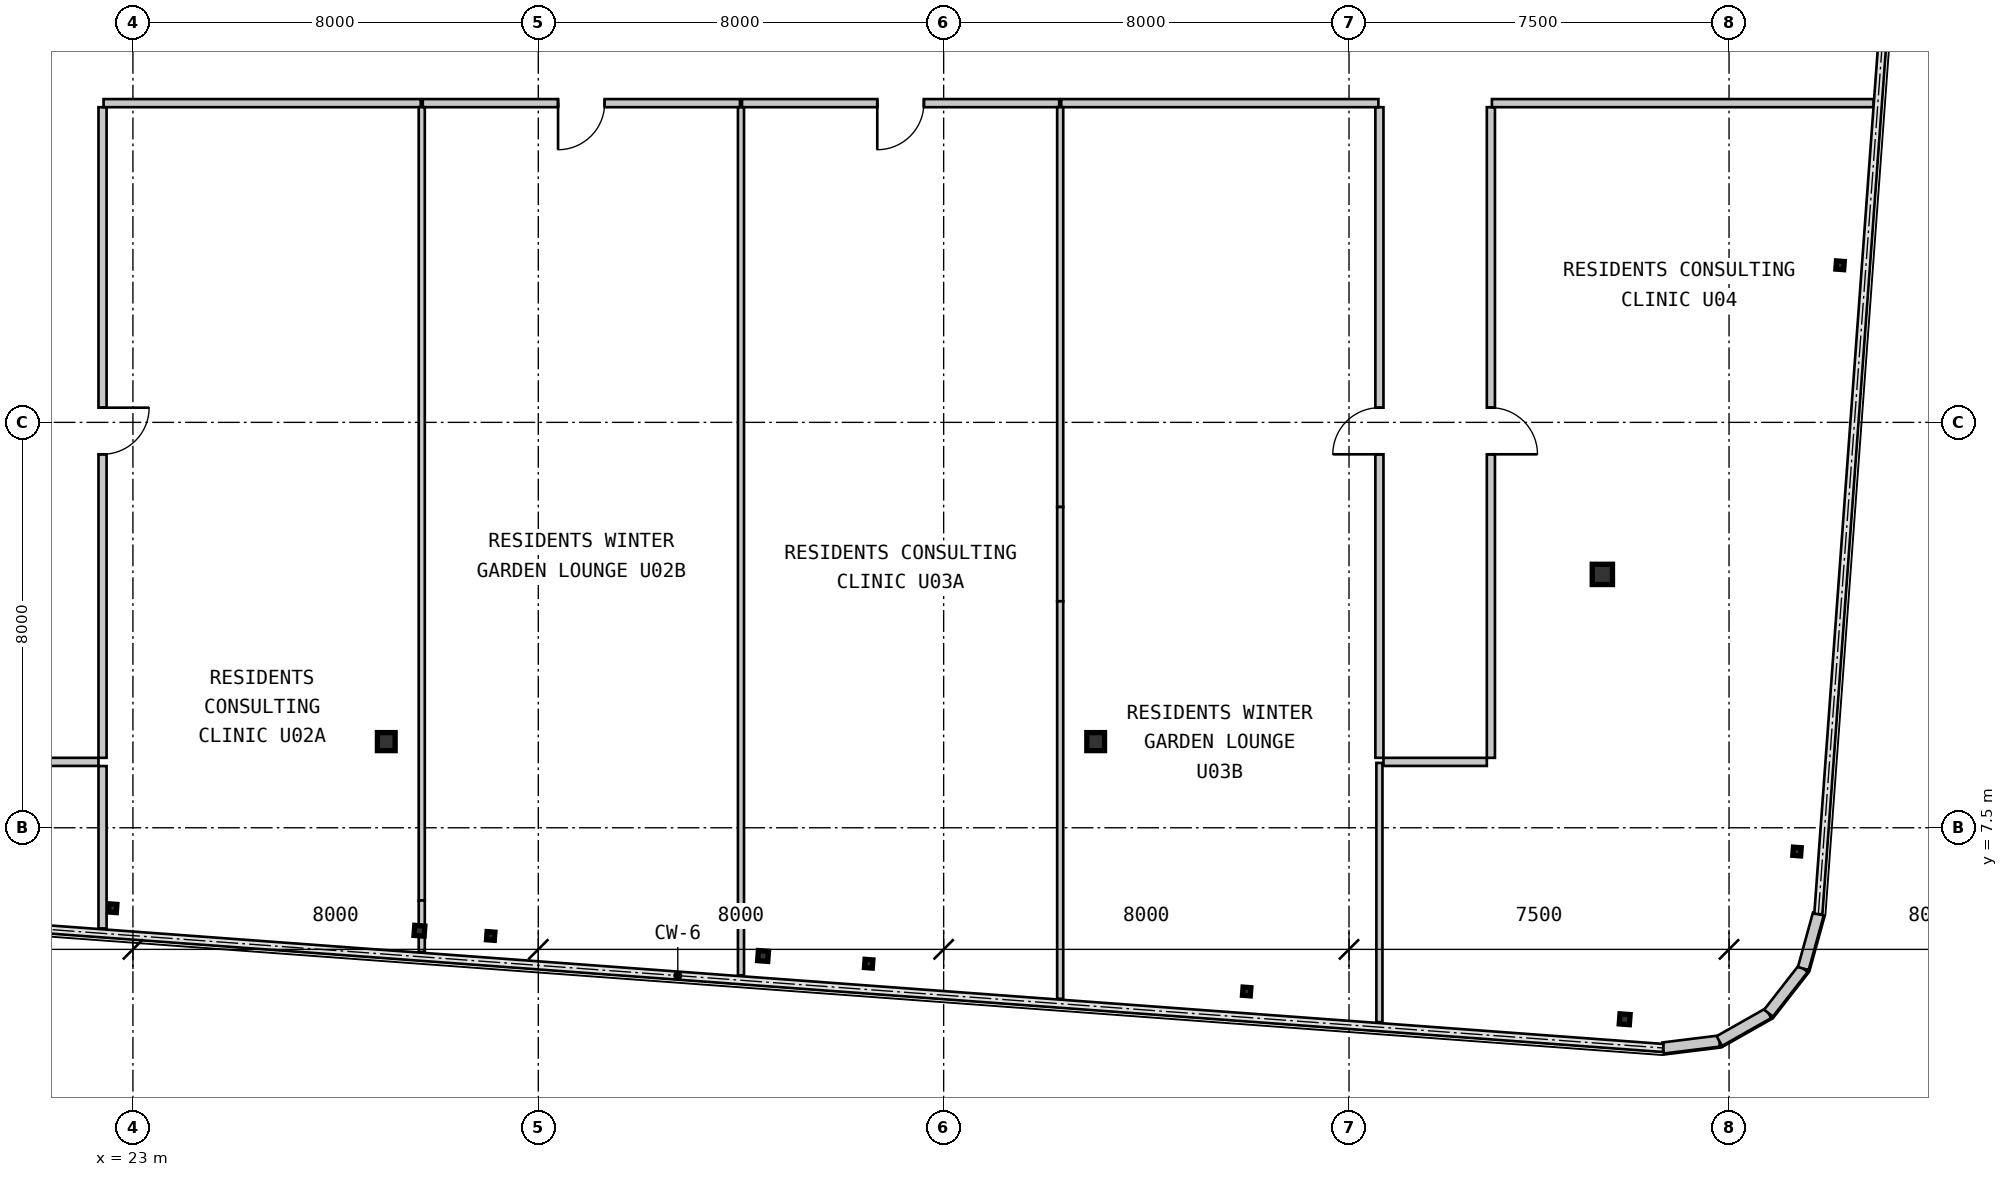
"""IFC4 building model, lengths in metres.
Left out: names, types, materials, properties, quantities, classifications, styles, units other than length and angle.
Written with IfcOpenShell. Run it as: python <this file> out.ifc"""

import sys

from ifc_helpers import new_model, si_unit, direction, frame, frame_2d, origin, origin_2d, place, context, subcontext, project, spatial, rectangle, hollow_rectangle, i_section, extrude, source, transform, mapped, element, fill, save


model = new_model("IFC4")
c1 = context("Model", 3, precision=1e-05, world=origin(), true_north=direction((0.0, 1.0)))
c2 = subcontext(c1, "Body", "Model", "MODEL_VIEW")
j1 = project(units=[si_unit("LENGTHUNIT", "METRE"), si_unit("PLANEANGLEUNIT", "RADIAN")], contexts=[c1])
p1 = place(None, origin())
s1 = spatial("IfcSite", under=j1, at=p1, CompositionType="ELEMENT")
p2 = place(p1, origin())
s2 = spatial("IfcBuilding", under=s1, at=p2, CompositionType="ELEMENT")
p3 = place(p2, frame((0.0, 0.0, 220.85)))
s3 = spatial("IfcBuildingStorey", under=s2, at=p3, CompositionType="ELEMENT", Elevation=220.85)
m1 = source(origin(), c2, "Body", "SweptSolid", [
    extrude(i_section(OverallWidth=0.35, OverallDepth=0.356, WebThickness=0.018, FlangeThickness=0.028, at=origin_2d()), origin(), (0.0, 0.0, 1.0), 3.15),
])
for number, where, z_axis, x_axis in (
    (1, (28.0, 9.2, 0.0), (0.0, 0.0, 1.0), (1.0, 0.0, 0.0)),
    (2, (42.0, 9.2, 0.0), (0.0, 0.0, 1.0), (1.0, 0.0, 0.0)),
):
    element("IfcColumn", number, at=place(p3, frame(where, z_axis=z_axis, x_axis=x_axis)), inside=s3, PredefinedType="COLUMN", context=c2, shape_type="MappedRepresentation", body=[
        mapped(m1, transform((0.0, 0.0, 0.0), scale=1.0)),
    ])
m2 = source(origin(), c2, "Body", "SweptSolid", [
    extrude(hollow_rectangle(XDim=0.4, YDim=0.4, WallThickness=0.016, at=origin_2d()), origin(), (0.0, 0.0, 1.0), 3.15),
])
p4 = place(p3, frame((52.0, 12.5, 0.0), z_axis=(0.0, 0.0, 1.0), x_axis=(1.0, 0.0, 0.0)))
e3 = element("IfcColumn", 3, at=p4, inside=s3, PredefinedType="COLUMN", context=c2, shape_type="MappedRepresentation", body=[
    mapped(m2, transform((0.0, 0.0, 0.0), scale=1.0)),
])
m3 = source(origin(), c2, "Body", "SweptSolid", [
    extrude(i_section(OverallWidth=0.154, OverallDepth=0.162, WebThickness=0.008, FlangeThickness=0.011, at=origin_2d()), origin(), (0.0, 0.0, 1.0), 3.15),
])
for number, where, z_axis, x_axis in (
    (4, (22.601, 5.912, 0.0), (0.0, 0.0, 1.0), (0.997, -0.073, 0.0)),
    (5, (30.061, 5.365, 0.0), (0.0, 0.0, 1.0), (0.997, -0.073, 0.0)),
    (6, (37.521, 4.817, 0.0), (0.0, 0.0, 1.0), (0.997, -0.073, 0.0)),
    (7, (44.98, 4.269, 0.0), (0.0, 0.0, 1.0), (0.997, -0.073, 0.0)),
):
    element("IfcColumn", number, at=place(p3, frame(where, z_axis=z_axis, x_axis=x_axis)), inside=s3, PredefinedType="COLUMN", context=c2, shape_type="MappedRepresentation", body=[
        mapped(m3, transform((0.0, 0.0, 0.0), scale=1.0)),
    ])
m4 = source(origin(), c2, "Body", "SweptSolid", [
    extrude(hollow_rectangle(XDim=0.2, YDim=0.2, WallThickness=0.009, at=origin_2d()), origin(), (0.0, 0.0, 1.0), 3.15),
])
p5 = place(p3, frame((52.44, 3.721, 0.0), z_axis=(0.0, 0.0, 1.0), x_axis=(0.997314477224, -0.073238197128, 0.0)))
e8 = element("IfcColumn", 8, at=p5, inside=s3, PredefinedType="COLUMN", context=c2, shape_type="MappedRepresentation", body=[
    mapped(m4, transform((0.0, 0.0, 0.0), scale=1.0)),
])
for number, where, z_axis, x_axis in (
    (9, (55.842, 7.031, 0.0), (0.0, 0.0, 1.0), (0.997, -0.073, 0.0)),
    (10, (56.691, 18.6, 0.0), (0.0, 0.0, 1.0), (0.997, -0.073, 0.0)),
):
    element("IfcColumn", number, at=place(p3, frame(where, z_axis=z_axis, x_axis=x_axis)), inside=s3, PredefinedType="COLUMN", context=c2, shape_type="MappedRepresentation", body=[
        mapped(m3, transform((0.0, 0.0, 0.0), scale=1.0)),
    ])
for number, where, z_axis, x_axis in (
    (11, (28.654, 5.468, 0.0), (0.0, 0.0, 1.0), (0.997, -0.073, 0.0)),
    (12, (35.436, 4.97, 0.0), (0.0, 0.0, 1.0), (0.997, -0.073, 0.0)),
):
    element("IfcColumn", number, at=place(p3, frame(where, z_axis=z_axis, x_axis=x_axis)), inside=s3, PredefinedType="COLUMN", context=c2, shape_type="MappedRepresentation", body=[
        mapped(m4, transform((0.0, 0.0, 0.0), scale=1.0)),
    ])
m5 = source(origin(), c2, "Body", "SweptSolid", [
    extrude(rectangle(XDim=1.116, YDim=0.22, at=frame_2d((0.558, 0.0))), origin(), (0.0, 0.0, 1.0), 2.93),
])
p6 = place(p3, frame((53.201, 3.154, 0.0), z_axis=(0.0, 0.0, 1.0), x_axis=(0.992438604032, 0.122742076028, 0.0)))
e13 = element("IfcWall", 13, at=p6, inside=s3, PredefinedType="SOLIDWALL", context=c2, shape_type="MappedRepresentation", body=[
    mapped(m5, transform((0.0, 0.0, 0.0), scale=1.0)),
])
m6 = source(origin(), c2, "Body", "SweptSolid", [
    extrude(rectangle(XDim=1.116, YDim=0.22, at=frame_2d((0.558, 0.0))), origin(), (0.0, 0.0, 1.0), 2.93),
])
p7 = place(p3, frame((54.308, 3.291, 0.0), z_axis=(0.0, 0.0, 1.0), x_axis=(0.869893934693, 0.49323882895, 0.0)))
e14 = element("IfcWall", 14, at=p7, inside=s3, PredefinedType="SOLIDWALL", context=c2, shape_type="MappedRepresentation", body=[
    mapped(m6, transform((0.0, 0.0, 0.0), scale=1.0)),
])
for number, where, z_axis, x_axis in (
    (15, (55.279, 3.841, 0.0), (0.0, 0.0, 1.0), (0.615, 0.789, 0.0)),
    (16, (55.965, 4.721, 0.0), (0.0, 0.0, 1.0), (0.266, 0.964, 0.0)),
):
    element("IfcWall", number, at=place(p3, frame(where, z_axis=z_axis, x_axis=x_axis)), inside=s3, PredefinedType="SOLIDWALL", context=c2, shape_type="MappedRepresentation", body=[
        mapped(m5, transform((0.0, 0.0, 0.0), scale=1.0)),
    ])
m7 = source(origin(), c2, "Body", "SweptSolid", [
    extrude(rectangle(XDim=2.04, YDim=0.16, at=frame_2d((1.02, 0.0))), origin(), (0.0, 0.0, 1.0), 2.93),
])
p8 = place(p3, frame((22.32, 8.8, 0.0), z_axis=(0.0, 0.0, 1.0), x_axis=(-1.0, 0.0, 0.0)))
e17 = element("IfcWall", 17, at=p8, inside=s3, PredefinedType="PARTITIONING", context=c2, shape_type="MappedRepresentation", body=[
    mapped(m7, transform((0.0, 0.0, 0.0), scale=1.0)),
])
m8 = source(origin(), c2, "Body", "SweptSolid", [
    extrude(rectangle(XDim=12.84, YDim=0.16, at=frame_2d((6.42, 0.0))), origin(), (0.0, 0.0, 1.0), 2.93),
])
p9 = place(p3, frame((22.4, 21.72, 0.0), z_axis=(0.0, 0.0, 1.0), x_axis=(0.0, -1.0, 0.0)))
e18 = element("IfcWall", 18, at=p9, inside=s3, PredefinedType="PARTITIONING", context=c2, shape_type="MappedRepresentation", body=[
    mapped(m8, transform((0.0, 0.0, 0.0), scale=1.0)),
])
m9 = source(origin(), c2, "Body", "SweptSolid", [
    extrude(rectangle(XDim=0.92, YDim=2.1, at=frame_2d((0.46, 1.05))), frame((0.0, 0.09, 0.0), z_axis=(0.0, -1.0, 0.0), x_axis=(1.0, 0.0, 0.0)), (0.0, 0.0, 1.0), 0.18),
])
p10 = place(p9, frame((5.93, 0.0, 0.0)))
e19 = element("IfcOpeningElement", 19, at=p10, cuts=e18, PredefinedType="OPENING", context=c2, shape_type="MappedRepresentation", body=[
    mapped(m9, transform((0.0, 0.0, 0.0), scale=1.0)),
])
m10 = source(origin(), c2, "Body", "SweptSolid", [
    extrude(rectangle(XDim=6.259, YDim=0.16, at=frame_2d((3.13, 0.0))), origin(), (0.0, 0.0, 1.0), 2.93),
])
p11 = place(p3, frame((28.68, 21.8, 0.0), z_axis=(0.0, 0.0, 1.0), x_axis=(-1.0, 0.0, 0.0)))
e20 = element("IfcWall", 20, at=p11, inside=s3, PredefinedType="PARTITIONING", context=c2, shape_type="MappedRepresentation", body=[
    mapped(m10, transform((0.0, 0.0, 0.0), scale=1.0)),
])
m11 = source(origin(), c2, "Body", "SweptSolid", [
    extrude(rectangle(XDim=6.26, YDim=0.16, at=frame_2d((3.13, 0.0))), origin(), (0.0, 0.0, 1.0), 2.93),
])
p12 = place(p3, frame((34.98, 21.8, 0.0), z_axis=(0.0, 0.0, 1.0), x_axis=(-1.0, 0.0, 0.0)))
e21 = element("IfcWall", 21, at=p12, inside=s3, PredefinedType="PARTITIONING", context=c2, shape_type="MappedRepresentation", body=[
    mapped(m11, transform((0.0, 0.0, 0.0), scale=1.0)),
])
p13 = place(p12, frame((2.67, 0.0, 0.0)))
e22 = element("IfcOpeningElement", 22, at=p13, cuts=e21, PredefinedType="OPENING", context=c2, shape_type="MappedRepresentation", body=[
    mapped(m9, transform((0.0, 0.0, 0.0), scale=1.0)),
])
p14 = place(p3, frame((41.28, 21.8, 0.0), z_axis=(0.0, 0.0, 1.0), x_axis=(-1.0, 0.0, 0.0)))
e23 = element("IfcWall", 23, at=p14, inside=s3, PredefinedType="PARTITIONING", context=c2, shape_type="MappedRepresentation", body=[
    mapped(m11, transform((0.0, 0.0, 0.0), scale=1.0)),
])
p15 = place(p14, frame((2.67, 0.0, 0.0)))
e24 = element("IfcOpeningElement", 24, at=p15, cuts=e23, PredefinedType="OPENING", context=c2, shape_type="MappedRepresentation", body=[
    mapped(m9, transform((0.0, 0.0, 0.0), scale=1.0)),
])
p16 = place(p3, frame((47.6, 8.88, 0.0), z_axis=(0.0, 0.0, 1.0), x_axis=(0.0, 1.0, 0.0)))
e25 = element("IfcWall", 25, at=p16, inside=s3, PredefinedType="PARTITIONING", context=c2, shape_type="MappedRepresentation", body=[
    mapped(m8, transform((0.0, 0.0, 0.0), scale=1.0)),
])
p17 = place(p16, frame((5.99, 0.0, 0.0)))
e26 = element("IfcOpeningElement", 26, at=p17, cuts=e25, PredefinedType="OPENING", context=c2, shape_type="MappedRepresentation", body=[
    mapped(m9, transform((0.0, 0.0, 0.0), scale=1.0)),
])
p18 = place(p3, frame((47.58, 21.8, 0.0), z_axis=(0.0, 0.0, 1.0), x_axis=(-1.0, 0.0, 0.0)))
e27 = element("IfcWall", 27, at=p18, inside=s3, PredefinedType="PARTITIONING", context=c2, shape_type="MappedRepresentation", body=[
    mapped(m10, transform((0.0, 0.0, 0.0), scale=1.0)),
])
p19 = place(p3, frame((49.8, 21.72, 0.0), z_axis=(0.0, 0.0, 1.0), x_axis=(0.0, -1.0, 0.0)))
e28 = element("IfcWall", 28, at=p19, inside=s3, PredefinedType="PARTITIONING", context=c2, shape_type="MappedRepresentation", body=[
    mapped(m8, transform((0.0, 0.0, 0.0), scale=1.0)),
])
p20 = place(p19, frame((5.93, 0.0, 0.0)))
e29 = element("IfcOpeningElement", 29, at=p20, cuts=e28, PredefinedType="OPENING", context=c2, shape_type="MappedRepresentation", body=[
    mapped(m9, transform((0.0, 0.0, 0.0), scale=1.0)),
])
m12 = source(origin(), c2, "Body", "SweptSolid", [
    extrude(rectangle(XDim=7.533, YDim=0.16, at=frame_2d((3.767, 0.0))), origin(), (0.0, 0.0, 1.0), 2.93),
])
p21 = place(p3, frame((57.353, 21.8, 0.0), z_axis=(0.0, 0.0, 1.0), x_axis=(-1.0, 0.0, 0.0)))
e30 = element("IfcWall", 30, at=p21, inside=s3, PredefinedType="PARTITIONING", context=c2, shape_type="MappedRepresentation", body=[
    mapped(m12, transform((0.0, 0.0, 0.0), scale=1.0)),
])
p22 = place(p3, frame((49.72, 8.8, 0.0), z_axis=(0.0, 0.0, 1.0), x_axis=(-1.0, 0.0, 0.0)))
e31 = element("IfcWall", 31, at=p22, inside=s3, PredefinedType="PARTITIONING", context=c2, shape_type="MappedRepresentation", body=[
    mapped(m7, transform((0.0, 0.0, 0.0), scale=1.0)),
])
m13 = source(origin(), c2, "Body", "SweptSolid", [
    extrude(rectangle(XDim=3.204, YDim=0.16, at=frame_2d((1.602, 0.0))), origin(), (0.0, 0.0, 1.0), 2.93),
])
p23 = place(p3, frame((22.4, 8.718, 0.0), z_axis=(0.0, 0.0, 1.0), x_axis=(0.0, -1.0, 0.0)))
e32 = element("IfcWall", 32, at=p23, inside=s3, PredefinedType="PARTITIONING", context=c2, shape_type="MappedRepresentation", body=[
    mapped(m13, transform((0.0, 0.0, 0.0), scale=1.0)),
])
m14 = source(origin(), c2, "Body", "SweptSolid", [
    extrude(rectangle(XDim=15.655, YDim=0.12, at=frame_2d((7.828, 0.0))), origin(), (0.0, 0.0, 1.0), 2.93),
])
p24 = place(p3, frame((28.7, 21.72, 0.0), z_axis=(0.0, 0.0, 1.0), x_axis=(0.0, -1.0, 0.0)))
e33 = element("IfcWall", 33, at=p24, inside=s3, PredefinedType="PARTITIONING", context=c2, shape_type="MappedRepresentation", body=[
    mapped(m14, transform((0.0, 0.0, 0.0), scale=1.0)),
])
m15 = source(origin(), c2, "Body", "SweptSolid", [
    extrude(rectangle(XDim=0.599, YDim=0.12, at=frame_2d((0.3, 0.0))), origin(), (0.0, 0.0, 1.0), 2.524),
])
p25 = place(p3, frame((28.7, 6.065, 0.0), z_axis=(0.0, 0.0, 1.0), x_axis=(0.0, -1.0, 0.0)))
e34 = element("IfcWall", 34, at=p25, inside=s3, PredefinedType="PARTITIONING", context=c2, shape_type="MappedRepresentation", body=[
    mapped(m15, transform((0.0, 0.0, 0.0), scale=1.0)),
])
m16 = source(origin(), c2, "Body", "SweptSolid", [
    extrude(rectangle(XDim=0.416, YDim=0.12, at=frame_2d((0.208, 0.0))), origin(), (0.0, 0.0, 1.0), 2.93),
])
p26 = place(p3, frame((28.7, 5.465, 0.0), z_axis=(0.0, 0.0, 1.0), x_axis=(0.0, -1.0, 0.0)))
e35 = element("IfcWall", 35, at=p26, inside=s3, PredefinedType="PARTITIONING", context=c2, shape_type="MappedRepresentation", body=[
    mapped(m16, transform((0.0, 0.0, 0.0), scale=1.0)),
])
m17 = source(origin(), c2, "Body", "SweptSolid", [
    extrude(rectangle(XDim=17.13, YDim=0.12, at=frame_2d((8.565, 0.0))), origin(), (0.0, 0.0, 1.0), 2.93),
])
p27 = place(p3, frame((35.0, 21.718, 0.0), z_axis=(0.0, 0.0, 1.0), x_axis=(0.0, -1.0, 0.0)))
e36 = element("IfcWall", 36, at=p27, inside=s3, PredefinedType="PARTITIONING", context=c2, shape_type="MappedRepresentation", body=[
    mapped(m17, transform((0.0, 0.0, 0.0), scale=1.0)),
])
m18 = source(origin(), c2, "Body", "SweptSolid", [
    extrude(rectangle(XDim=7.89, YDim=0.12, at=frame_2d((3.945, 0.0))), origin(), (0.0, 0.0, 1.0), 2.93),
])
p28 = place(p3, frame((41.3, 21.72, 0.0), z_axis=(0.0, 0.0, 1.0), x_axis=(0.0, -1.0, 0.0)))
e37 = element("IfcWall", 37, at=p28, inside=s3, PredefinedType="PARTITIONING", context=c2, shape_type="MappedRepresentation", body=[
    mapped(m18, transform((0.0, 0.0, 0.0), scale=1.0)),
])
m19 = source(origin(), c2, "Body", "SweptSolid", [
    extrude(rectangle(XDim=1.861, YDim=0.12, at=frame_2d((0.93, 0.0))), origin(), (0.0, 0.0, 1.0), 2.328),
])
p29 = place(p3, frame((41.3, 13.83, 0.0), z_axis=(0.0, 0.0, 1.0), x_axis=(0.0, -1.0, 0.0)))
e38 = element("IfcWall", 38, at=p29, inside=s3, PredefinedType="PARTITIONING", context=c2, shape_type="MappedRepresentation", body=[
    mapped(m19, transform((0.0, 0.0, 0.0), scale=1.0)),
])
m20 = source(origin(), c2, "Body", "SweptSolid", [
    extrude(rectangle(XDim=7.845, YDim=0.12, at=frame_2d((3.923, 0.0))), origin(), (0.0, 0.0, 1.0), 2.93),
])
p30 = place(p3, frame((41.3, 11.969, 0.0), z_axis=(0.0, 0.0, 1.0), x_axis=(0.0, -1.0, 0.0)))
e39 = element("IfcWall", 39, at=p30, inside=s3, PredefinedType="PARTITIONING", context=c2, shape_type="MappedRepresentation", body=[
    mapped(m20, transform((0.0, 0.0, 0.0), scale=1.0)),
])
m21 = source(origin(), c2, "Body", "SweptSolid", [
    extrude(rectangle(XDim=5.116, YDim=0.12, at=frame_2d((2.558, 0.0))), origin(), (0.0, 0.0, 1.0), 2.93),
])
p31 = place(p3, frame((47.6, 8.78, 0.0), z_axis=(0.0, 0.0, 1.0), x_axis=(0.0, -1.0, 0.0)))
e40 = element("IfcWall", 40, at=p31, inside=s3, PredefinedType="PARTITIONING", context=c2, shape_type="MappedRepresentation", body=[
    mapped(m21, transform((0.0, 0.0, 0.0), scale=1.0)),
])
m22 = source(origin(), c2, "Body", "SweptSolid", [
    extrude(rectangle(XDim=0.92, YDim=2.1, at=frame_2d((0.46, 1.05))), frame((0.0, 0.025, 0.0), z_axis=(0.0, -1.0, 0.0), x_axis=(1.0, 0.0, 0.0)), (0.0, 0.0, 1.0), 0.05),
])
p32 = place(p10, origin())
e41 = element("IfcDoor", 41, at=p32, inside=s3, OperationType="SINGLE_SWING_LEFT", PredefinedType="DOOR", context=c2, shape_type="MappedRepresentation", body=[
    mapped(m22, transform((0.0, 0.0, 0.0), scale=1.0)),
])
fill(e19, e41)
p33 = place(p13, origin())
e42 = element("IfcDoor", 42, at=p33, inside=s3, OperationType="SINGLE_SWING_RIGHT", PredefinedType="DOOR", context=c2, shape_type="MappedRepresentation", body=[
    mapped(m22, transform((0.0, 0.0, 0.0), scale=1.0)),
])
fill(e22, e42)
p34 = place(p15, origin())
e43 = element("IfcDoor", 43, at=p34, inside=s3, OperationType="SINGLE_SWING_RIGHT", PredefinedType="DOOR", context=c2, shape_type="MappedRepresentation", body=[
    mapped(m22, transform((0.0, 0.0, 0.0), scale=1.0)),
])
fill(e24, e43)
p35 = place(p17, origin())
e44 = element("IfcDoor", 44, at=p35, inside=s3, OperationType="SINGLE_SWING_LEFT", PredefinedType="DOOR", context=c2, shape_type="MappedRepresentation", body=[
    mapped(m22, transform((0.0, 0.0, 0.0), scale=1.0)),
])
fill(e26, e44)
p36 = place(p20, origin())
e45 = element("IfcDoor", 45, at=p36, inside=s3, OperationType="SINGLE_SWING_RIGHT", PredefinedType="DOOR", context=c2, shape_type="MappedRepresentation", body=[
    mapped(m22, transform((0.0, 0.0, 0.0), scale=1.0)),
])
fill(e29, e45)
save(model, sys.argv[1])
